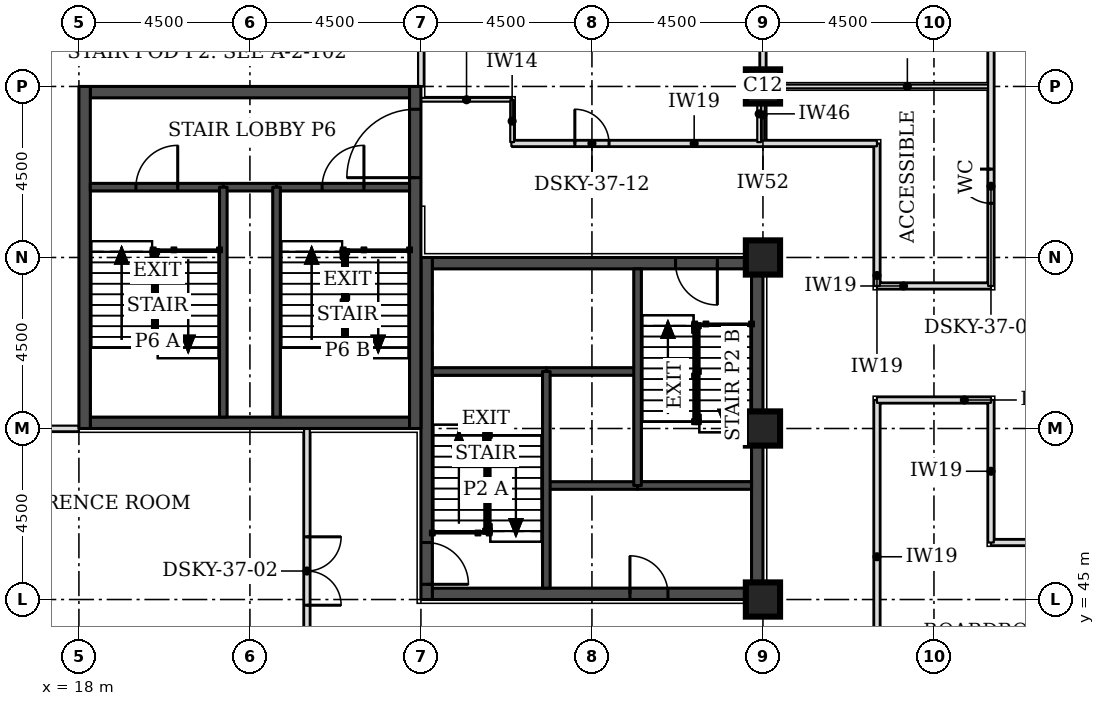
"""IFC4 building model, lengths in metres.
Left out: names, types, materials, properties, quantities, classifications, styles, units other than length and angle.
Written with IfcOpenShell. Run it as: python <this file> out.ifc"""

import sys

from ifc_helpers import new_model, si_unit, direction, frame, frame_2d, origin, origin_2d, place, context, subcontext, project, spatial, rectangle, extrude, element, fill, save


model = new_model("IFC4")
c1 = context("Model", 3, precision=1e-05, world=origin(), true_north=direction((0.0, 1.0)))
c2 = subcontext(c1, "Body", "Model", "MODEL_VIEW")
j1 = project(units=[si_unit("LENGTHUNIT", "METRE"), si_unit("PLANEANGLEUNIT", "RADIAN")], contexts=[c1])
p1 = place(None, origin())
s1 = spatial("IfcSite", under=j1, at=p1, CompositionType="ELEMENT")
p2 = place(p1, origin())
s2 = spatial("IfcBuilding", under=s1, at=p2, CompositionType="ELEMENT")
p3 = place(p2, frame((0.0, 0.0, 143.1)))
s3 = spatial("IfcBuildingStorey", under=s2, at=p3, CompositionType="ELEMENT", Elevation=143.1)
for number, where, z_axis, x_axis in (
    (1, (36.0, 45.0, 0.0), (0.0, 0.0, 1.0), (1.0, 0.0, 0.0)),
    (2, (36.0, 49.5, 0.0), (0.0, 0.0, 1.0), (1.0, 0.0, 0.0)),
    (3, (36.0, 54.0, 0.0), (0.0, 0.0, 1.0), (1.0, 0.0, 0.0)),
    (4, (36.0, 58.5, 0.0), (0.0, 0.0, 1.0), (1.0, 0.0, 0.0)),
):
    element("IfcColumn", number, at=place(p3, frame(where, z_axis=z_axis, x_axis=x_axis)), inside=s3, PredefinedType="COLUMN", context=c2, shape_type="SweptSolid", body=[
        extrude(rectangle(XDim=0.9, YDim=0.9, at=origin_2d()), origin(), (0.0, 0.0, 1.0), 4.6),
    ])
p4 = place(p3, frame((27.3, 45.15, 0.0), z_axis=(0.0, 0.0, 1.0), x_axis=(1.0, 0.0, 0.0)))
e5 = element("IfcWall", 5, at=p4, inside=s3, PredefinedType="SHEAR", context=c2, shape_type="SweptSolid", body=[
    extrude(rectangle(XDim=8.4, YDim=0.3, at=frame_2d((4.2, 0.0))), origin(), (0.0, 0.0, 1.0), 4.6),
])
p5 = place(p4, frame((5.2, 0.0, 0.0)))
e6 = element("IfcOpeningElement", 6, at=p5, cuts=e5, PredefinedType="OPENING", context=c2, shape_type="SweptSolid", body=[
    extrude(rectangle(XDim=1.0, YDim=2.1, at=frame_2d((0.5, 1.05))), frame((0.0, 0.16, 0.0), z_axis=(0.0, -1.0, 0.0), x_axis=(1.0, 0.0, 0.0)), (0.0, 0.0, 1.0), 0.32),
])
p6 = place(p3, frame((27.3, 53.85, 0.0), z_axis=(0.0, 0.0, 1.0), x_axis=(1.0, 0.0, 0.0)))
e7 = element("IfcWall", 7, at=p6, inside=s3, PredefinedType="SHEAR", context=c2, shape_type="SweptSolid", body=[
    extrude(rectangle(XDim=8.4, YDim=0.3, at=frame_2d((4.2, 0.0))), origin(), (0.0, 0.0, 1.0), 4.6),
])
p7 = place(p6, frame((6.4, 0.0, 0.0)))
e8 = element("IfcOpeningElement", 8, at=p7, cuts=e7, PredefinedType="OPENING", context=c2, shape_type="SweptSolid", body=[
    extrude(rectangle(XDim=1.1, YDim=2.1, at=frame_2d((0.55, 1.05))), frame((0.0, 0.16, 0.0), z_axis=(0.0, -1.0, 0.0), x_axis=(1.0, 0.0, 0.0)), (0.0, 0.0, 1.0), 0.32),
])
p8 = place(p3, frame((27.15, 45.0, 0.0), z_axis=(0.0, 0.0, 1.0), x_axis=(0.0, 1.0, 0.0)))
e9 = element("IfcWall", 9, at=p8, inside=s3, PredefinedType="SHEAR", context=c2, shape_type="SweptSolid", body=[
    extrude(rectangle(XDim=9.0, YDim=0.3, at=frame_2d((4.5, 0.0))), origin(), (0.0, 0.0, 1.0), 4.6),
])
p9 = place(p8, frame((0.4, 0.0, 0.0)))
e10 = element("IfcOpeningElement", 10, at=p9, cuts=e9, PredefinedType="OPENING", context=c2, shape_type="SweptSolid", body=[
    extrude(rectangle(XDim=1.1, YDim=2.1, at=frame_2d((0.55, 1.05))), frame((0.0, 0.16, 0.0), z_axis=(0.0, -1.0, 0.0), x_axis=(1.0, 0.0, 0.0)), (0.0, 0.0, 1.0), 0.32),
])
p10 = place(p3, frame((35.85, 45.0, 0.0), z_axis=(0.0, 0.0, 1.0), x_axis=(0.0, 1.0, 0.0)))
e11 = element("IfcWall", 11, at=p10, inside=s3, PredefinedType="SHEAR", context=c2, shape_type="SweptSolid", body=[
    extrude(rectangle(XDim=9.0, YDim=0.3, at=frame_2d((4.5, 0.0))), origin(), (0.0, 0.0, 1.0), 4.6),
])
for number, where, z_axis, x_axis in (
    (12, (18.3, 49.65, 0.0), (0.0, 0.0, 1.0), (1.0, 0.0, 0.0)),
    (13, (18.3, 58.35, 0.0), (0.0, 0.0, 1.0), (1.0, 0.0, 0.0)),
):
    element("IfcWall", number, at=place(p3, frame(where, z_axis=z_axis, x_axis=x_axis)), inside=s3, PredefinedType="SHEAR", context=c2, shape_type="SweptSolid", body=[
        extrude(rectangle(XDim=8.4, YDim=0.3, at=frame_2d((4.2, 0.0))), origin(), (0.0, 0.0, 1.0), 4.6),
    ])
p11 = place(p3, frame((18.15, 49.5, 0.0), z_axis=(0.0, 0.0, 1.0), x_axis=(0.0, 1.0, 0.0)))
e14 = element("IfcWall", 14, at=p11, inside=s3, PredefinedType="SHEAR", context=c2, shape_type="SweptSolid", body=[
    extrude(rectangle(XDim=9.0, YDim=0.3, at=frame_2d((4.5, 0.0))), origin(), (0.0, 0.0, 1.0), 4.6),
])
p12 = place(p3, frame((26.85, 49.5, 0.0), z_axis=(0.0, 0.0, 1.0), x_axis=(0.0, 1.0, 0.0)))
e15 = element("IfcWall", 15, at=p12, inside=s3, PredefinedType="SHEAR", context=c2, shape_type="SweptSolid", body=[
    extrude(rectangle(XDim=9.0, YDim=0.3, at=frame_2d((4.5, 0.0))), origin(), (0.0, 0.0, 1.0), 4.6),
])
p13 = place(p12, frame((6.6, 0.0, 0.0)))
e16 = element("IfcOpeningElement", 16, at=p13, cuts=e15, PredefinedType="OPENING", context=c2, shape_type="SweptSolid", body=[
    extrude(rectangle(XDim=1.8, YDim=2.1, at=frame_2d((0.9, 1.05))), frame((0.0, 0.16, 0.0), z_axis=(0.0, -1.0, 0.0), x_axis=(1.0, 0.0, 0.0)), (0.0, 0.0, 1.0), 0.32),
])
p14 = place(p3, frame((17.792, 63.676, 0.0), z_axis=(0.0, 0.0, 1.0), x_axis=(-0.707106781187, -0.707106781187, 0.0)))
e17 = element("IfcWall", 17, at=p14, inside=s3, PredefinedType="STANDARD", context=c2, shape_type="SweptSolid", body=[
    extrude(rectangle(XDim=7.027, YDim=0.35, at=frame_2d((3.513, 0.0))), origin(), (0.0, 0.0, 1.0), 4.425),
])
p15 = place(p14, frame((1.863, 0.0, 0.9)))
e18 = element("IfcOpeningElement", 18, at=p15, cuts=e17, PredefinedType="OPENING", context=c2, shape_type="SweptSolid", body=[
    extrude(rectangle(XDim=3.3, YDim=2.7, at=frame_2d((1.65, 1.35))), frame((0.0, 0.185, 0.0), z_axis=(0.0, -1.0, 0.0), x_axis=(1.0, 0.0, 0.0)), (0.0, 0.0, 1.0), 0.37),
])
p16 = place(p3, frame((12.824, 44.792, 0.0), z_axis=(0.0, 0.0, 1.0), x_axis=(0.707106781187, -0.707106781187, 0.0)))
e19 = element("IfcWall", 19, at=p16, inside=s3, PredefinedType="STANDARD", context=c2, shape_type="SweptSolid", body=[
    extrude(rectangle(XDim=7.027, YDim=0.35, at=frame_2d((3.513, 0.0))), origin(), (0.0, 0.0, 1.0), 4.425),
])
p17 = place(p16, frame((1.863, 0.0, 0.9)))
e20 = element("IfcOpeningElement", 20, at=p17, cuts=e19, PredefinedType="OPENING", context=c2, shape_type="SweptSolid", body=[
    extrude(rectangle(XDim=3.3, YDim=2.7, at=frame_2d((1.65, 1.35))), frame((0.0, 0.185, 0.0), z_axis=(0.0, -1.0, 0.0), x_axis=(1.0, 0.0, 0.0)), (0.0, 0.0, 1.0), 0.37),
])
p18 = place(p3, frame((36.0, 57.0, 0.0), z_axis=(0.0, 0.0, 1.0), x_axis=(0.0, 1.0, 0.0)))
e21 = element("IfcWall", 21, at=p18, inside=s3, PredefinedType="PARTITIONING", context=c2, shape_type="SweptSolid", body=[
    extrude(rectangle(XDim=1.5, YDim=0.1, at=frame_2d((0.75, 0.0))), origin(), (0.0, 0.0, 1.0), 3.7),
])
p19 = place(p3, frame((36.0, 58.5, 0.0), z_axis=(0.0, 0.0, 1.0), x_axis=(1.0, 0.0, 0.0)))
e22 = element("IfcWall", 22, at=p19, inside=s3, PredefinedType="PARTITIONING", context=c2, shape_type="SweptSolid", body=[
    extrude(rectangle(XDim=6.0, YDim=0.1, at=frame_2d((3.0, 0.0))), origin(), (0.0, 0.0, 1.0), 4.45),
])
p20 = place(p3, frame((24.0, 42.0, 0.0), z_axis=(0.0, 0.0, 1.0), x_axis=(0.0, 1.0, 0.0)))
e23 = element("IfcWall", 23, at=p20, inside=s3, PredefinedType="PARTITIONING", context=c2, shape_type="SweptSolid", body=[
    extrude(rectangle(XDim=7.5, YDim=0.15, at=frame_2d((3.75, 0.0))), origin(), (0.0, 0.0, 1.0), 4.45),
])
p21 = place(p20, frame((2.85, 0.0, 0.0)))
e24 = element("IfcOpeningElement", 24, at=p21, cuts=e23, PredefinedType="OPENING", context=c2, shape_type="SweptSolid", body=[
    extrude(rectangle(XDim=1.8, YDim=2.1, at=frame_2d((0.9, 1.05))), frame((0.0, 0.085, 0.0), z_axis=(0.0, -1.0, 0.0), x_axis=(1.0, 0.0, 0.0)), (0.0, 0.0, 1.0), 0.17),
])
p22 = place(p3, frame((39.0, 42.0, 0.0), z_axis=(0.0, 0.0, 1.0), x_axis=(0.0, 1.0, 0.0)))
e25 = element("IfcWall", 25, at=p22, inside=s3, PredefinedType="PARTITIONING", context=c2, shape_type="SweptSolid", body=[
    extrude(rectangle(XDim=8.25, YDim=0.15, at=frame_2d((4.125, 0.0))), origin(), (0.0, 0.0, 1.0), 4.45),
])
p23 = place(p3, frame((42.0, 46.5, 0.0), z_axis=(0.0, 0.0, 1.0), x_axis=(1.0, 0.0, 0.0)))
e26 = element("IfcWall", 26, at=p23, inside=s3, PredefinedType="PARTITIONING", context=c2, shape_type="SweptSolid", body=[
    extrude(rectangle(XDim=28.5, YDim=0.15, at=frame_2d((14.25, 0.0))), origin(), (0.0, 0.0, 1.0), 4.45),
])
p24 = place(p23, frame((7.05, 0.0, 0.0)))
e27 = element("IfcOpeningElement", 27, at=p24, cuts=e26, PredefinedType="OPENING", context=c2, shape_type="SweptSolid", body=[
    extrude(rectangle(XDim=0.9, YDim=2.1, at=frame_2d((0.45, 1.05))), frame((0.0, 0.085, 0.0), z_axis=(0.0, -1.0, 0.0), x_axis=(1.0, 0.0, 0.0)), (0.0, 0.0, 1.0), 0.17),
])
p25 = place(p23, frame((16.05, 0.0, 0.0)))
e28 = element("IfcOpeningElement", 28, at=p25, cuts=e26, PredefinedType="OPENING", context=c2, shape_type="SweptSolid", body=[
    extrude(rectangle(XDim=0.9, YDim=2.1, at=frame_2d((0.45, 1.05))), frame((0.0, 0.085, 0.0), z_axis=(0.0, -1.0, 0.0), x_axis=(1.0, 0.0, 0.0)), (0.0, 0.0, 1.0), 0.17),
])
p26 = place(p23, frame((23.85, 0.0, 0.0)))
e29 = element("IfcOpeningElement", 29, at=p26, cuts=e26, PredefinedType="OPENING", context=c2, shape_type="SweptSolid", body=[
    extrude(rectangle(XDim=1.8, YDim=2.1, at=frame_2d((0.9, 1.05))), frame((0.0, 0.085, 0.0), z_axis=(0.0, -1.0, 0.0), x_axis=(1.0, 0.0, 0.0)), (0.0, 0.0, 1.0), 0.17),
])
p27 = place(p3, frame((42.0, 46.5, 0.0), z_axis=(0.0, 0.0, 1.0), x_axis=(0.0, 1.0, 0.0)))
e30 = element("IfcWall", 30, at=p27, inside=s3, PredefinedType="PARTITIONING", context=c2, shape_type="SweptSolid", body=[
    extrude(rectangle(XDim=3.75, YDim=0.15, at=frame_2d((1.875, 0.0))), origin(), (0.0, 0.0, 1.0), 4.45),
])
for number, where, z_axis, x_axis in (
    (31, (39.0, 50.25, 0.0), (0.0, 0.0, 1.0), (1.0, 0.0, 0.0)),
    (32, (39.0, 53.25, 0.0), (0.0, 0.0, 1.0), (1.0, 0.0, 0.0)),
):
    element("IfcWall", number, at=place(p3, frame(where, z_axis=z_axis, x_axis=x_axis)), inside=s3, PredefinedType="PARTITIONING", context=c2, shape_type="SweptSolid", body=[
        extrude(rectangle(XDim=3.0, YDim=0.15, at=frame_2d((1.5, 0.0))), origin(), (0.0, 0.0, 1.0), 4.45),
    ])
p28 = place(p3, frame((39.0, 53.25, 0.0), z_axis=(0.0, 0.0, 1.0), x_axis=(0.0, 1.0, 0.0)))
e33 = element("IfcWall", 33, at=p28, inside=s3, PredefinedType="PARTITIONING", context=c2, shape_type="SweptSolid", body=[
    extrude(rectangle(XDim=3.75, YDim=0.15, at=frame_2d((1.875, 0.0))), origin(), (0.0, 0.0, 1.0), 4.45),
])
p29 = place(p3, frame((42.0, 53.25, 0.0), z_axis=(0.0, 0.0, 1.0), x_axis=(0.0, 1.0, 0.0)))
e34 = element("IfcWall", 34, at=p29, inside=s3, PredefinedType="PARTITIONING", context=c2, shape_type="SweptSolid", body=[
    extrude(rectangle(XDim=21.75, YDim=0.15, at=frame_2d((10.875, 0.0))), origin(), (0.0, 0.0, 1.0), 4.45),
])
p30 = place(p29, frame((2.175, 0.0, 0.0)))
e35 = element("IfcOpeningElement", 35, at=p30, cuts=e34, PredefinedType="OPENING", context=c2, shape_type="SweptSolid", body=[
    extrude(rectangle(XDim=0.9, YDim=2.1, at=frame_2d((0.45, 1.05))), frame((0.0, 0.085, 0.0), z_axis=(0.0, -1.0, 0.0), x_axis=(1.0, 0.0, 0.0)), (0.0, 0.0, 1.0), 0.17),
])
p31 = place(p29, frame((9.3, 0.0, 0.0)))
e36 = element("IfcOpeningElement", 36, at=p31, cuts=e34, PredefinedType="OPENING", context=c2, shape_type="SweptSolid", body=[
    extrude(rectangle(XDim=0.9, YDim=2.1, at=frame_2d((0.45, 1.05))), frame((0.0, 0.085, 0.0), z_axis=(0.0, -1.0, 0.0), x_axis=(1.0, 0.0, 0.0)), (0.0, 0.0, 1.0), 0.17),
])
p32 = place(p29, frame((17.1, 0.0, 0.0)))
e37 = element("IfcOpeningElement", 37, at=p32, cuts=e34, PredefinedType="OPENING", context=c2, shape_type="SweptSolid", body=[
    extrude(rectangle(XDim=1.8, YDim=2.1, at=frame_2d((0.9, 1.05))), frame((0.0, 0.085, 0.0), z_axis=(0.0, -1.0, 0.0), x_axis=(1.0, 0.0, 0.0)), (0.0, 0.0, 1.0), 0.17),
])
p33 = place(p3, frame((29.38, 57.0, 0.0), z_axis=(0.0, 0.0, 1.0), x_axis=(1.0, 0.0, 0.0)))
e38 = element("IfcWall", 38, at=p33, inside=s3, PredefinedType="PARTITIONING", context=c2, shape_type="SweptSolid", body=[
    extrude(rectangle(XDim=9.62, YDim=0.15, at=frame_2d((4.81, 0.0))), origin(), (0.0, 0.0, 1.0), 4.45),
])
p34 = place(p33, frame((1.67, 0.0, 0.0)))
e39 = element("IfcOpeningElement", 39, at=p34, cuts=e38, PredefinedType="OPENING", context=c2, shape_type="SweptSolid", body=[
    extrude(rectangle(XDim=0.9, YDim=2.1, at=frame_2d((0.45, 1.05))), frame((0.0, 0.085, 0.0), z_axis=(0.0, -1.0, 0.0), x_axis=(1.0, 0.0, 0.0)), (0.0, 0.0, 1.0), 0.17),
])
for number, where, z_axis, x_axis in (
    (40, (13.95, 49.5, 0.0), (0.0, 0.0, 1.0), (1.0, 0.0, 0.0)),
    (41, (27.0, 58.5, 0.0), (0.0, 0.0, 1.0), (0.0, 1.0, 0.0)),
):
    element("IfcWall", number, at=place(p3, frame(where, z_axis=z_axis, x_axis=x_axis)), inside=s3, PredefinedType="PARTITIONING", context=c2, shape_type="SweptSolid", body=[
        extrude(rectangle(XDim=4.05, YDim=0.15, at=frame_2d((2.025, 0.0))), origin(), (0.0, 0.0, 1.0), 4.45),
    ])
p35 = place(p3, frame((36.0, 58.5, 0.0), z_axis=(0.0, 0.0, 1.0), x_axis=(0.0, 1.0, 0.0)))
e42 = element("IfcWall", 42, at=p35, inside=s3, PredefinedType="PARTITIONING", context=c2, shape_type="SweptSolid", body=[
    extrude(rectangle(XDim=4.05, YDim=0.15, at=frame_2d((2.025, 0.0))), origin(), (0.0, 0.0, 1.0), 3.7),
])
p36 = place(p3, frame((27.0, 58.15, 0.0), z_axis=(0.0, 0.0, 1.0), x_axis=(1.0, 0.0, 0.0)))
e43 = element("IfcWall", 43, at=p36, inside=s3, PredefinedType="PARTITIONING", context=c2, shape_type="SweptSolid", body=[
    extrude(rectangle(XDim=2.4, YDim=0.1, at=frame_2d((1.2, 0.0))), origin(), (0.0, 0.0, 1.0), 4.45),
])
p37 = place(p3, frame((29.4, 58.14, 0.0), z_axis=(0.0, 0.0, 1.0), x_axis=(0.0, -1.0, 0.0)))
e44 = element("IfcWall", 44, at=p37, inside=s3, PredefinedType="PARTITIONING", context=c2, shape_type="SweptSolid", body=[
    extrude(rectangle(XDim=1.105, YDim=0.1, at=frame_2d((0.552, 0.0))), origin(), (0.0, 0.0, 1.0), 4.45),
])
p38 = place(p3, frame((35.9, 58.523, 0.0), z_axis=(0.0, 0.0, 1.0), x_axis=(0.0, -1.0, 0.0)))
e45 = element("IfcWall", 45, at=p38, inside=s3, PredefinedType="PARTITIONING", context=c2, shape_type="SweptSolid", body=[
    extrude(rectangle(XDim=1.488, YDim=0.1, at=frame_2d((0.744, 0.0))), origin(), (0.0, 0.0, 1.0), 3.7),
])
p39 = place(p3, frame((30.3, 48.0, 0.0), z_axis=(0.0, 0.0, 1.0), x_axis=(1.0, 0.0, 0.0)))
e46 = element("IfcWall", 46, at=p39, inside=s3, PredefinedType="SOLIDWALL", context=c2, shape_type="SweptSolid", body=[
    extrude(rectangle(XDim=2.4, YDim=0.2, at=frame_2d((1.2, 0.0))), origin(), (0.0, 0.0, 1.0), 4.45),
])
p40 = place(p3, frame((32.7, 48.0, 0.0), z_axis=(0.0, 0.0, 1.0), x_axis=(1.0, 0.0, 0.0)))
e47 = element("IfcWall", 47, at=p40, inside=s3, PredefinedType="SOLIDWALL", context=c2, shape_type="SweptSolid", body=[
    extrude(rectangle(XDim=3.0, YDim=0.2, at=frame_2d((1.5, 0.0))), origin(), (0.0, 0.0, 1.0), 4.45),
])
p41 = place(p3, frame((30.3, 51.0, 0.0), z_axis=(0.0, 0.0, 1.0), x_axis=(1.0, 0.0, 0.0)))
e48 = element("IfcWall", 48, at=p41, inside=s3, PredefinedType="SOLIDWALL", context=c2, shape_type="SweptSolid", body=[
    extrude(rectangle(XDim=2.4, YDim=0.2, at=frame_2d((1.2, 0.0))), origin(), (0.0, 0.0, 1.0), 4.6),
])
p42 = place(p3, frame((27.3, 51.0, 0.0), z_axis=(0.0, 0.0, 1.0), x_axis=(1.0, 0.0, 0.0)))
e49 = element("IfcWall", 49, at=p42, inside=s3, PredefinedType="SOLIDWALL", context=c2, shape_type="SweptSolid", body=[
    extrude(rectangle(XDim=3.0, YDim=0.2, at=frame_2d((1.5, 0.0))), origin(), (0.0, 0.0, 1.0), 4.45),
])
for number, where, z_axis, x_axis in (
    (50, (30.3, 45.3, 0.0), (0.0, 0.0, 1.0), (0.0, 1.0, 0.0)),
    (51, (32.7, 48.0, 0.0), (0.0, 0.0, 1.0), (0.0, 1.0, 0.0)),
):
    element("IfcWall", number, at=place(p3, frame(where, z_axis=z_axis, x_axis=x_axis)), inside=s3, PredefinedType="SOLIDWALL", context=c2, shape_type="SweptSolid", body=[
        extrude(rectangle(XDim=5.7, YDim=0.2, at=frame_2d((2.85, 0.0))), origin(), (0.0, 0.0, 1.0), 4.45),
    ])
p43 = place(p3, frame((21.8, 55.85, 0.0), z_axis=(0.0, 0.0, 1.0), x_axis=(1.0, 0.0, 0.0)))
e52 = element("IfcWall", 52, at=p43, inside=s3, PredefinedType="SOLIDWALL", context=c2, shape_type="SweptSolid", body=[
    extrude(rectangle(XDim=1.4, YDim=0.2, at=frame_2d((0.7, 0.0))), origin(), (0.0, 0.0, 1.0), 4.45),
])
p44 = place(p3, frame((18.3, 55.85, 0.0), z_axis=(0.0, 0.0, 1.0), x_axis=(1.0, 0.0, 0.0)))
e53 = element("IfcWall", 53, at=p44, inside=s3, PredefinedType="SOLIDWALL", context=c2, shape_type="SweptSolid", body=[
    extrude(rectangle(XDim=3.5, YDim=0.2, at=frame_2d((1.75, 0.0))), origin(), (0.0, 0.0, 1.0), 4.45),
])
p45 = place(p44, frame((1.2, 0.0, 0.0)))
e54 = element("IfcOpeningElement", 54, at=p45, cuts=e53, PredefinedType="OPENING", context=c2, shape_type="SweptSolid", body=[
    extrude(rectangle(XDim=1.1, YDim=2.1, at=frame_2d((0.55, 1.05))), frame((0.0, 0.11, 0.0), z_axis=(0.0, -1.0, 0.0), x_axis=(1.0, 0.0, 0.0)), (0.0, 0.0, 1.0), 0.22),
])
p46 = place(p3, frame((23.2, 55.85, 0.0), z_axis=(0.0, 0.0, 1.0), x_axis=(1.0, 0.0, 0.0)))
e55 = element("IfcWall", 55, at=p46, inside=s3, PredefinedType="SOLIDWALL", context=c2, shape_type="SweptSolid", body=[
    extrude(rectangle(XDim=3.5, YDim=0.2, at=frame_2d((1.75, 0.0))), origin(), (0.0, 0.0, 1.0), 4.45),
])
p47 = place(p46, frame((1.2, 0.0, 0.0)))
e56 = element("IfcOpeningElement", 56, at=p47, cuts=e55, PredefinedType="OPENING", context=c2, shape_type="SweptSolid", body=[
    extrude(rectangle(XDim=1.1, YDim=2.1, at=frame_2d((0.55, 1.05))), frame((0.0, 0.11, 0.0), z_axis=(0.0, -1.0, 0.0), x_axis=(1.0, 0.0, 0.0)), (0.0, 0.0, 1.0), 0.22),
])
for number, where, z_axis, x_axis in (
    (57, (21.8, 49.8, 0.0), (0.0, 0.0, 1.0), (0.0, 1.0, 0.0)),
    (58, (23.2, 49.8, 0.0), (0.0, 0.0, 1.0), (0.0, 1.0, 0.0)),
):
    element("IfcWall", number, at=place(p3, frame(where, z_axis=z_axis, x_axis=x_axis)), inside=s3, PredefinedType="SOLIDWALL", context=c2, shape_type="SweptSolid", body=[
        extrude(rectangle(XDim=6.05, YDim=0.2, at=frame_2d((3.025, 0.0))), origin(), (0.0, 0.0, 1.0), 4.45),
    ])
p48 = place(p21, frame((1.8, 0.0, 0.0), z_axis=(0.0, 0.0, 1.0), x_axis=(-1.0, 0.0, 0.0)))
e59 = element("IfcDoor", 59, at=p48, inside=s3, OperationType="DOUBLE_DOOR_SINGLE_SWING", PredefinedType="DOOR", context=c2, shape_type="SweptSolid", body=[
    extrude(rectangle(XDim=1.8, YDim=2.1, at=frame_2d((0.9, 1.05))), frame((0.0, 0.025, 0.0), z_axis=(0.0, -1.0, 0.0), x_axis=(1.0, 0.0, 0.0)), (0.0, 0.0, 1.0), 0.05),
])
fill(e24, e59)
p49 = place(p30, origin())
e60 = element("IfcDoor", 60, at=p49, inside=s3, OperationType="SINGLE_SWING_RIGHT", PredefinedType="DOOR", context=c2, shape_type="SweptSolid", body=[
    extrude(rectangle(XDim=0.9, YDim=2.1, at=frame_2d((0.45, 1.05))), frame((0.0, 0.025, 0.0), z_axis=(0.0, -1.0, 0.0), x_axis=(1.0, 0.0, 0.0)), (0.0, 0.0, 1.0), 0.05),
])
fill(e35, e60)
p50 = place(p34, origin())
e61 = element("IfcDoor", 61, at=p50, inside=s3, OperationType="SINGLE_SWING_LEFT", PredefinedType="DOOR", context=c2, shape_type="SweptSolid", body=[
    extrude(rectangle(XDim=0.9, YDim=2.1, at=frame_2d((0.45, 1.05))), frame((0.0, 0.025, 0.0), z_axis=(0.0, -1.0, 0.0), x_axis=(1.0, 0.0, 0.0)), (0.0, 0.0, 1.0), 0.05),
])
fill(e39, e61)
p51 = place(p9, frame((1.1, 0.0, 0.0), z_axis=(0.0, 0.0, 1.0), x_axis=(-1.0, 0.0, 0.0)))
e62 = element("IfcDoor", 62, at=p51, inside=s3, OperationType="SINGLE_SWING_RIGHT", PredefinedType="DOOR", context=c2, shape_type="SweptSolid", body=[
    extrude(rectangle(XDim=1.1, YDim=2.1, at=frame_2d((0.55, 1.05))), frame((0.0, 0.025, 0.0), z_axis=(0.0, -1.0, 0.0), x_axis=(1.0, 0.0, 0.0)), (0.0, 0.0, 1.0), 0.05),
])
fill(e10, e62)
p52 = place(p7, frame((1.1, 0.0, 0.0), z_axis=(0.0, 0.0, 1.0), x_axis=(-1.0, 0.0, 0.0)))
e63 = element("IfcDoor", 63, at=p52, inside=s3, OperationType="SINGLE_SWING_LEFT", PredefinedType="DOOR", context=c2, shape_type="SweptSolid", body=[
    extrude(rectangle(XDim=1.1, YDim=2.1, at=frame_2d((0.55, 1.05))), frame((0.0, 0.025, 0.0), z_axis=(0.0, -1.0, 0.0), x_axis=(1.0, 0.0, 0.0)), (0.0, 0.0, 1.0), 0.05),
])
fill(e8, e63)
p53 = place(p5, origin())
e64 = element("IfcDoor", 64, at=p53, inside=s3, OperationType="SINGLE_SWING_LEFT", PredefinedType="DOOR", context=c2, shape_type="SweptSolid", body=[
    extrude(rectangle(XDim=1.0, YDim=2.1, at=frame_2d((0.5, 1.05))), frame((0.0, 0.025, 0.0), z_axis=(0.0, -1.0, 0.0), x_axis=(1.0, 0.0, 0.0)), (0.0, 0.0, 1.0), 0.05),
])
fill(e6, e64)
p54 = place(p45, origin())
e65 = element("IfcDoor", 65, at=p54, inside=s3, OperationType="SINGLE_SWING_RIGHT", PredefinedType="DOOR", context=c2, shape_type="SweptSolid", body=[
    extrude(rectangle(XDim=1.1, YDim=2.1, at=frame_2d((0.55, 1.05))), frame((0.0, 0.025, 0.0), z_axis=(0.0, -1.0, 0.0), x_axis=(1.0, 0.0, 0.0)), (0.0, 0.0, 1.0), 0.05),
])
fill(e54, e65)
p55 = place(p47, origin())
e66 = element("IfcDoor", 66, at=p55, inside=s3, OperationType="SINGLE_SWING_RIGHT", PredefinedType="DOOR", context=c2, shape_type="SweptSolid", body=[
    extrude(rectangle(XDim=1.1, YDim=2.1, at=frame_2d((0.55, 1.05))), frame((0.0, 0.025, 0.0), z_axis=(0.0, -1.0, 0.0), x_axis=(1.0, 0.0, 0.0)), (0.0, 0.0, 1.0), 0.05),
])
fill(e56, e66)
p56 = place(p13, origin())
e67 = element("IfcDoor", 67, at=p56, inside=s3, OperationType="SINGLE_SWING_LEFT", PredefinedType="DOOR", context=c2, shape_type="SweptSolid", body=[
    extrude(rectangle(XDim=1.8, YDim=2.1, at=frame_2d((0.9, 1.05))), frame((0.0, 0.025, 0.0), z_axis=(0.0, -1.0, 0.0), x_axis=(1.0, 0.0, 0.0)), (0.0, 0.0, 1.0), 0.05),
])
fill(e16, e67)
save(model, sys.argv[1])
